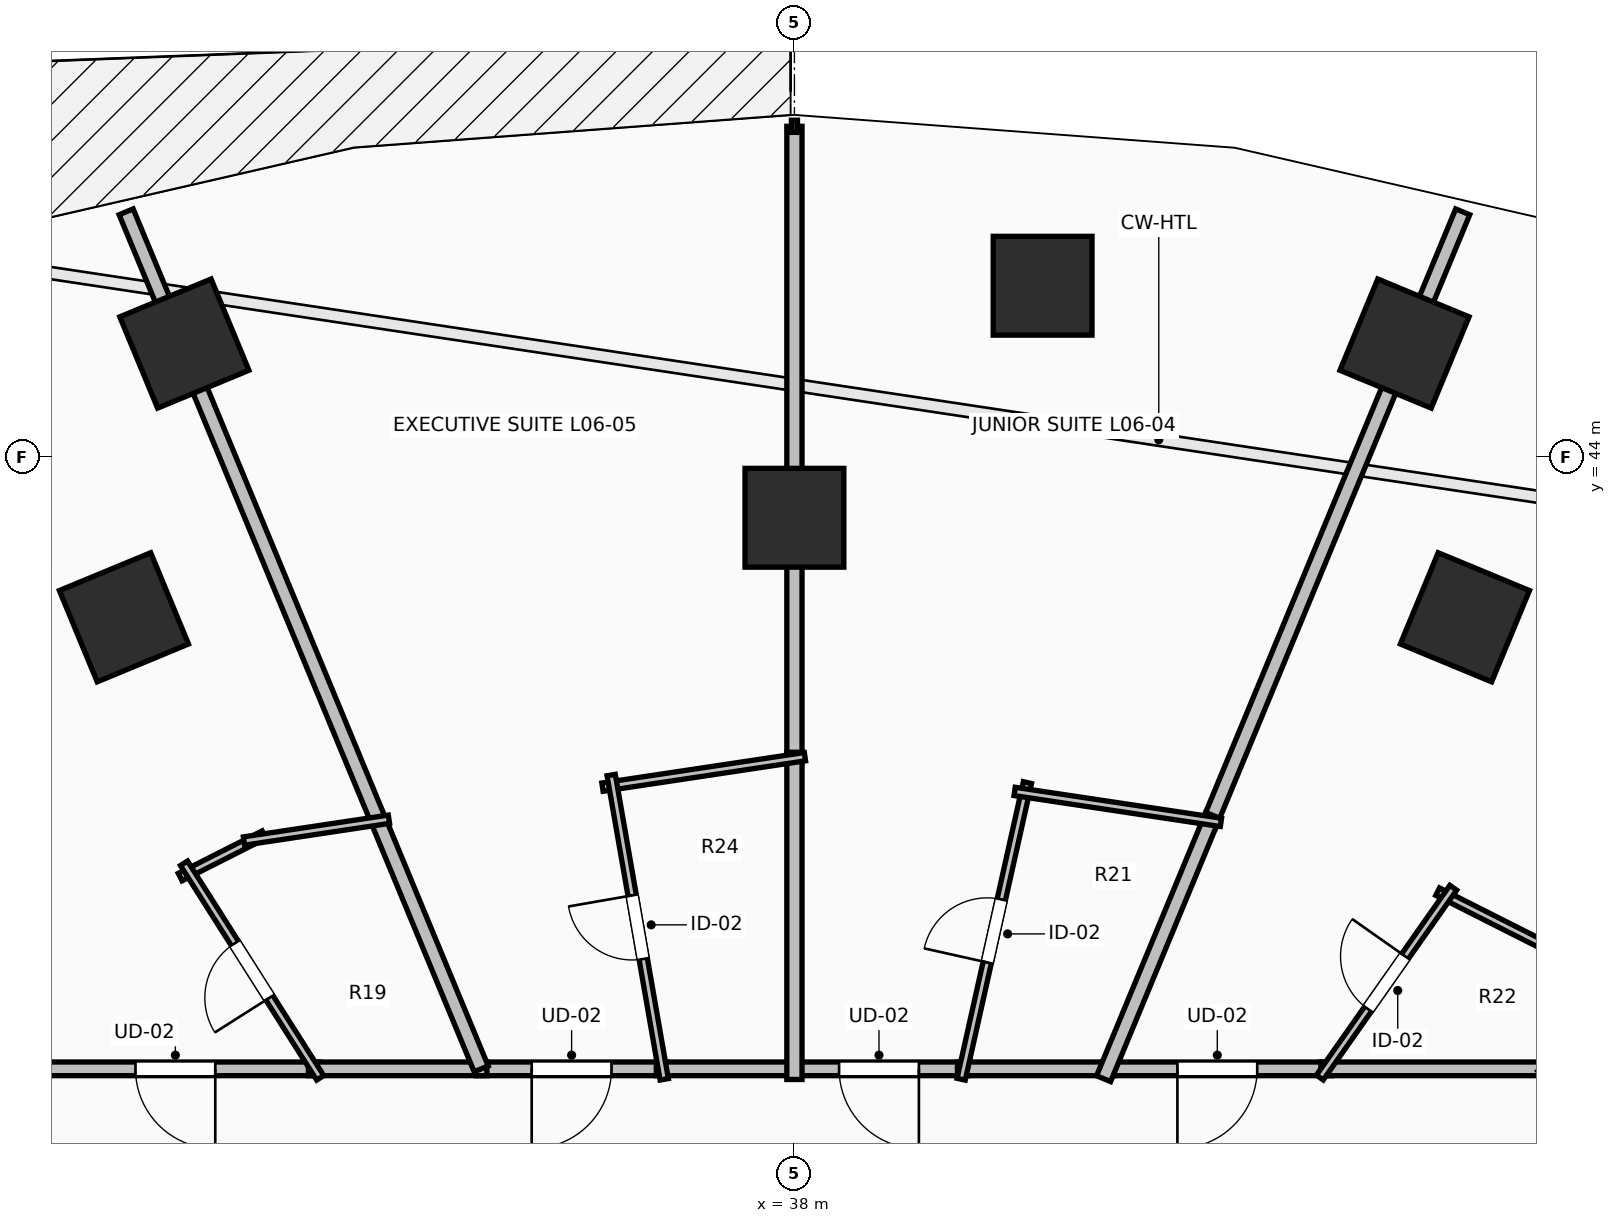
"""IFC4 building model, lengths in metres.
Left out: names, types, materials, properties, quantities, classifications, styles, units other than length and angle.
Written with IfcOpenShell. Run it as: python <this file> out.ifc"""

import sys

from ifc_helpers import new_model, si_unit, direction, frame, frame_2d, origin, origin_2d, place, context, subcontext, project, spatial, rectangle, extrude, element, fill, save


model = new_model("IFC4")
c1 = context("Model", 3, precision=1e-05, world=origin(), true_north=direction((0.0, 1.0)))
c2 = subcontext(c1, "Body", "Model", "MODEL_VIEW")
j1 = project(units=[si_unit("LENGTHUNIT", "METRE"), si_unit("PLANEANGLEUNIT", "RADIAN")], contexts=[c1])
p1 = place(None, origin())
s1 = spatial("IfcSite", under=j1, at=p1, CompositionType="ELEMENT")
p2 = place(p1, origin())
s2 = spatial("IfcBuilding", under=s1, at=p2, CompositionType="ELEMENT")
p3 = place(p2, frame((0.0, 0.0, 27.5)))
s3 = spatial("IfcBuildingStorey", under=s2, at=p3, CompositionType="ELEMENT", Elevation=27.5)
for number, where, z_axis, x_axis in (
    (1, (46.821, 41.891, 0.0), (0.0, 0.0, 1.0), (0.383, 0.924, 0.0)),
    (2, (38.0, 43.2, 0.0), (0.0, 0.0, 1.0), (0.0, 1.0, 0.0)),
    (3, (29.179, 41.891, 0.0), (0.0, 0.0, 1.0), (-0.383, 0.924, 0.0)),
    (4, (46.026, 45.492, 0.0), (0.0, 0.0, 1.0), (0.383, 0.924, 0.0)),
    (5, (41.265, 46.252, 0.0), (0.0, 0.0, 1.0), (0.0, 1.0, 0.0)),
    (6, (29.974, 45.492, 0.0), (0.0, 0.0, 1.0), (-0.383, 0.924, 0.0)),
):
    element("IfcColumn", number, at=place(p3, frame(where, z_axis=z_axis, x_axis=x_axis)), inside=s3, PredefinedType="COLUMN", context=c2, shape_type="SweptSolid", body=[
        extrude(rectangle(XDim=1.3, YDim=1.3, at=origin_2d()), origin(), (0.0, 0.0, 1.0), 3.5),
    ])
p4 = place(p3, frame((45.066, 35.95, 0.0), z_axis=(0.0, 0.0, 1.0), x_axis=(-1.0, 0.0, 0.0)))
e7 = element("IfcWall", 7, at=p4, inside=s3, PredefinedType="PARTITIONING", context=c2, shape_type="SweptSolid", body=[
    extrude(rectangle(XDim=3.005, YDim=0.18, at=frame_2d((1.502, 0.0))), origin(), (0.0, 0.0, 1.0), 3.24),
])
p5 = place(p4, frame((0.978, 0.0, 0.0)))
e8 = element("IfcOpeningElement", 8, at=p5, cuts=e7, PredefinedType="OPENING", context=c2, shape_type="SweptSolid", body=[
    extrude(rectangle(XDim=1.05, YDim=2.2, at=frame_2d((0.525, 1.1))), frame((0.0, 0.105, 0.0), z_axis=(0.0, -1.0, 0.0), x_axis=(1.0, 0.0, 0.0)), (0.0, 0.0, 1.0), 0.21),
])
p6 = place(p3, frame((48.03, 35.95, 0.0), z_axis=(0.0, 0.0, 1.0), x_axis=(-1.0, 0.0, 0.0)))
e9 = element("IfcWall", 9, at=p6, inside=s3, PredefinedType="PARTITIONING", context=c2, shape_type="SweptSolid", body=[
    extrude(rectangle(XDim=3.104, YDim=0.18, at=frame_2d((1.552, 0.0))), origin(), (0.0, 0.0, 1.0), 2.432),
])
p7 = place(p3, frame((40.285, 35.95, 0.0), z_axis=(0.0, 0.0, 1.0), x_axis=(-1.0, 0.0, 0.0)))
e10 = element("IfcWall", 10, at=p7, inside=s3, PredefinedType="PARTITIONING", context=c2, shape_type="SweptSolid", body=[
    extrude(rectangle(XDim=2.345, YDim=0.18, at=frame_2d((1.172, 0.0))), origin(), (0.0, 0.0, 1.0), 3.24),
])
p8 = place(p7, frame((0.647, 0.0, 0.0)))
e11 = element("IfcOpeningElement", 11, at=p8, cuts=e10, PredefinedType="OPENING", context=c2, shape_type="SweptSolid", body=[
    extrude(rectangle(XDim=1.05, YDim=2.2, at=frame_2d((0.525, 1.1))), frame((0.0, 0.105, 0.0), z_axis=(0.0, -1.0, 0.0), x_axis=(1.0, 0.0, 0.0)), (0.0, 0.0, 1.0), 0.21),
])
p9 = place(p3, frame((42.201, 35.95, 0.0), z_axis=(0.0, 0.0, 1.0), x_axis=(-1.0, 0.0, 0.0)))
e12 = element("IfcWall", 12, at=p9, inside=s3, PredefinedType="PARTITIONING", context=c2, shape_type="SweptSolid", body=[
    extrude(rectangle(XDim=2.056, YDim=0.18, at=frame_2d((1.028, 0.0))), origin(), (0.0, 0.0, 1.0), 3.24),
])
p10 = place(p3, frame((36.323, 35.95, 0.0), z_axis=(0.0, 0.0, 1.0), x_axis=(-1.0, 0.0, 0.0)))
e13 = element("IfcWall", 13, at=p10, inside=s3, PredefinedType="PARTITIONING", context=c2, shape_type="SweptSolid", body=[
    extrude(rectangle(XDim=2.509, YDim=0.18, at=frame_2d((1.254, 0.0))), origin(), (0.0, 0.0, 1.0), 3.24),
])
p11 = place(p10, frame((0.729, 0.0, 0.0)))
e14 = element("IfcOpeningElement", 14, at=p11, cuts=e13, PredefinedType="OPENING", context=c2, shape_type="SweptSolid", body=[
    extrude(rectangle(XDim=1.05, YDim=2.2, at=frame_2d((0.525, 1.1))), frame((0.0, 0.105, 0.0), z_axis=(0.0, -1.0, 0.0), x_axis=(1.0, 0.0, 0.0)), (0.0, 0.0, 1.0), 0.21),
])
p12 = place(p3, frame((38.08, 35.95, 0.0), z_axis=(0.0, 0.0, 1.0), x_axis=(-1.0, 0.0, 0.0)))
e15 = element("IfcWall", 15, at=p12, inside=s3, PredefinedType="PARTITIONING", context=c2, shape_type="SweptSolid", body=[
    extrude(rectangle(XDim=1.897, YDim=0.18, at=frame_2d((0.948, 0.0))), origin(), (0.0, 0.0, 1.0), 3.24),
])
p13 = place(p3, frame((31.746, 35.95, 0.0), z_axis=(0.0, 0.0, 1.0), x_axis=(-1.0, 0.0, 0.0)))
e16 = element("IfcWall", 16, at=p13, inside=s3, PredefinedType="PARTITIONING", context=c2, shape_type="SweptSolid", body=[
    extrude(rectangle(XDim=3.781, YDim=0.18, at=frame_2d((1.891, 0.0))), origin(), (0.0, 0.0, 1.0), 2.432),
])
p14 = place(p13, frame((1.365, 0.0, 0.0)))
e17 = element("IfcOpeningElement", 17, at=p14, cuts=e16, PredefinedType="OPENING", context=c2, shape_type="SweptSolid", body=[
    extrude(rectangle(XDim=1.05, YDim=2.2, at=frame_2d((0.525, 1.1))), frame((0.0, 0.105, 0.0), z_axis=(0.0, -1.0, 0.0), x_axis=(1.0, 0.0, 0.0)), (0.0, 0.0, 1.0), 0.21),
])
p15 = place(p3, frame((33.954, 35.95, 0.0), z_axis=(0.0, 0.0, 1.0), x_axis=(-1.0, 0.0, 0.0)))
e18 = element("IfcWall", 18, at=p15, inside=s3, PredefinedType="PARTITIONING", context=c2, shape_type="SweptSolid", body=[
    extrude(rectangle(XDim=2.348, YDim=0.18, at=frame_2d((1.174, 0.0))), origin(), (0.0, 0.0, 1.0), 3.24),
])
p16 = place(p3, frame((46.462, 38.281, 0.0), z_axis=(0.0, 0.0, 1.0), x_axis=(0.892486842203, -0.451073426944, 0.0)))
e19 = element("IfcWall", 19, at=p16, inside=s3, PredefinedType="PARTITIONING", context=c2, shape_type="SweptSolid", body=[
    extrude(rectangle(XDim=2.982, YDim=0.11, at=frame_2d((1.491, 0.0))), origin(), (0.0, 0.0, 1.0), 2.432),
])
p17 = place(p3, frame((44.913, 35.835, 0.0), z_axis=(0.0, 0.0, 1.0), x_axis=(0.574986040322, 0.818163219312, 0.0)))
e20 = element("IfcWall", 20, at=p17, inside=s3, PredefinedType="PARTITIONING", context=c2, shape_type="SweptSolid", body=[
    extrude(rectangle(XDim=3.052, YDim=0.11, at=frame_2d((1.526, 0.0))), origin(), (0.0, 0.0, 1.0), 2.922),
])
p18 = place(p17, frame((1.101, 0.0, 0.0)))
e21 = element("IfcOpeningElement", 21, at=p18, cuts=e20, PredefinedType="OPENING", context=c2, shape_type="SweptSolid", body=[
    extrude(rectangle(XDim=0.85, YDim=2.1, at=frame_2d((0.425, 1.05))), frame((0.0, 0.07, 0.0), z_axis=(0.0, -1.0, 0.0), x_axis=(1.0, 0.0, 0.0)), (0.0, 0.0, 1.0), 0.14),
])
p19 = place(p3, frame((46.792, 47.225, 0.0), z_axis=(0.0, 0.0, 1.0), x_axis=(-0.382750893248, -0.923851586413, 0.0)))
e22 = element("IfcWall", 22, at=p19, inside=s3, PredefinedType="PARTITIONING", context=c2, shape_type="SweptSolid", body=[
    extrude(rectangle(XDim=8.734, YDim=0.2, at=frame_2d((4.367, 0.0))), origin(), (0.0, 0.0, 1.0), 2.874),
])
p20 = place(p3, frame((43.503, 39.285, 0.0), z_axis=(0.0, 0.0, 1.0), x_axis=(-0.382867331148, -0.923803337697, 0.0)))
e23 = element("IfcWall", 23, at=p20, inside=s3, PredefinedType="PARTITIONING", context=c2, shape_type="SweptSolid", body=[
    extrude(rectangle(XDim=3.75, YDim=0.2, at=frame_2d((1.875, 0.0))), origin(), (0.0, 0.0, 1.0), 2.922),
])
p21 = place(p3, frame((40.194, 35.813, 0.0), z_axis=(0.0, 0.0, 1.0), x_axis=(0.21804880916, 0.975937865248, 0.0)))
e24 = element("IfcWall", 24, at=p21, inside=s3, PredefinedType="PARTITIONING", context=c2, shape_type="SweptSolid", body=[
    extrude(rectangle(XDim=3.998, YDim=0.11, at=frame_2d((1.999, 0.0))), origin(), (0.0, 0.0, 1.0), 2.922),
])
p22 = place(p21, frame((1.574, 0.0, 0.0)))
e25 = element("IfcOpeningElement", 25, at=p22, cuts=e24, PredefinedType="OPENING", context=c2, shape_type="SweptSolid", body=[
    extrude(rectangle(XDim=0.85, YDim=2.1, at=frame_2d((0.425, 1.05))), frame((0.0, 0.07, 0.0), z_axis=(0.0, -1.0, 0.0), x_axis=(1.0, 0.0, 0.0)), (0.0, 0.0, 1.0), 0.14),
])
p23 = place(p3, frame((40.896, 39.6, 0.0), z_axis=(0.0, 0.0, 1.0), x_axis=(0.98891024541, -0.148514398367, 0.0)))
e26 = element("IfcWall", 26, at=p23, inside=s3, PredefinedType="PARTITIONING", context=c2, shape_type="SweptSolid", body=[
    extrude(rectangle(XDim=2.745, YDim=0.11, at=frame_2d((1.373, 0.0))), origin(), (0.0, 0.0, 1.0), 3.24),
])
p24 = place(p3, frame((38.0, 48.35, 0.0), z_axis=(0.0, 0.0, 1.0), x_axis=(0.0, -1.0, 0.0)))
e27 = element("IfcWall", 27, at=p24, inside=s3, PredefinedType="PARTITIONING", context=c2, shape_type="SweptSolid", body=[
    extrude(rectangle(XDim=8.375, YDim=0.2, at=frame_2d((4.188, 0.0))), origin(), (0.0, 0.0, 1.0), 2.432),
])
p25 = place(p3, frame((38.0, 40.115, 0.0), z_axis=(0.0, 0.0, 1.0), x_axis=(0.0, -1.0, 0.0)))
e28 = element("IfcWall", 28, at=p25, inside=s3, PredefinedType="PARTITIONING", context=c2, shape_type="SweptSolid", body=[
    extrude(rectangle(XDim=4.305, YDim=0.2, at=frame_2d((2.152, 0.0))), origin(), (0.0, 0.0, 1.0), 2.922),
])
p26 = place(p3, frame((35.475, 39.656, 0.0), z_axis=(0.0, 0.0, 1.0), x_axis=(0.988878442063, 0.148726012595, 0.0)))
e29 = element("IfcWall", 29, at=p26, inside=s3, PredefinedType="PARTITIONING", context=c2, shape_type="SweptSolid", body=[
    extrude(rectangle(XDim=2.694, YDim=0.11, at=frame_2d((1.347, 0.0))), origin(), (0.0, 0.0, 1.0), 3.24),
])
p27 = place(p3, frame((36.287, 35.812, 0.0), z_axis=(0.0, 0.0, 1.0), x_axis=(-0.171838135253, 0.985125197766, 0.0)))
e30 = element("IfcWall", 30, at=p27, inside=s3, PredefinedType="PARTITIONING", context=c2, shape_type="SweptSolid", body=[
    extrude(rectangle(XDim=4.063, YDim=0.11, at=frame_2d((2.032, 0.0))), origin(), (0.0, 0.0, 1.0), 2.922),
])
p28 = place(p27, frame((1.607, 0.0, 0.0)))
e31 = element("IfcOpeningElement", 31, at=p28, cuts=e30, PredefinedType="OPENING", context=c2, shape_type="SweptSolid", body=[
    extrude(rectangle(XDim=0.85, YDim=2.1, at=frame_2d((0.425, 1.05))), frame((0.0, 0.07, 0.0), z_axis=(0.0, -1.0, 0.0), x_axis=(1.0, 0.0, 0.0)), (0.0, 0.0, 1.0), 0.14),
])
p29 = place(p3, frame((29.208, 47.225, 0.0), z_axis=(0.0, 0.0, 1.0), x_axis=(0.382723985517, -0.923862733803, 0.0)))
e32 = element("IfcWall", 32, at=p29, inside=s3, PredefinedType="PARTITIONING", context=c2, shape_type="SweptSolid", body=[
    extrude(rectangle(XDim=12.204, YDim=0.2, at=frame_2d((6.102, 0.0))), origin(), (0.0, 0.0, 1.0), 2.432),
])
p30 = place(p3, frame((29.919, 38.473, 0.0), z_axis=(0.0, 0.0, 1.0), x_axis=(0.892084606746, 0.45186840386, 0.0)))
e33 = element("IfcWall", 33, at=p30, inside=s3, PredefinedType="PARTITIONING", context=c2, shape_type="SweptSolid", body=[
    extrude(rectangle(XDim=1.236, YDim=0.11, at=frame_2d((0.618, 0.0))), origin(), (0.0, 0.0, 1.0), 3.24),
])
p31 = place(p3, frame((30.759, 38.947, 0.0), z_axis=(0.0, 0.0, 1.0), x_axis=(0.988889867338, 0.148650026153, 0.0)))
e34 = element("IfcWall", 34, at=p31, inside=s3, PredefinedType="PARTITIONING", context=c2, shape_type="SweptSolid", body=[
    extrude(rectangle(XDim=1.928, YDim=0.11, at=frame_2d((0.964, 0.0))), origin(), (0.0, 0.0, 1.0), 3.24),
])
p32 = place(p3, frame((31.761, 35.832, 0.0), z_axis=(0.0, 0.0, 1.0), x_axis=(-0.535991614842, 0.844223305067, 0.0)))
e35 = element("IfcWall", 35, at=p32, inside=s3, PredefinedType="PARTITIONING", context=c2, shape_type="SweptSolid", body=[
    extrude(rectangle(XDim=3.343, YDim=0.11, at=frame_2d((1.672, 0.0))), origin(), (0.0, 0.0, 1.0), 2.432),
])
p33 = place(p32, frame((1.247, 0.0, 0.0)))
e36 = element("IfcOpeningElement", 36, at=p33, cuts=e35, PredefinedType="OPENING", context=c2, shape_type="SweptSolid", body=[
    extrude(rectangle(XDim=0.85, YDim=2.1, at=frame_2d((0.425, 1.05))), frame((0.0, 0.07, 0.0), z_axis=(0.0, -1.0, 0.0), x_axis=(1.0, 0.0, 0.0)), (0.0, 0.0, 1.0), 0.14),
])
p34 = place(p5, origin())
e37 = element("IfcDoor", 37, at=p34, inside=s3, OperationType="SINGLE_SWING_RIGHT", PredefinedType="DOOR", context=c2, shape_type="SweptSolid", body=[
    extrude(rectangle(XDim=1.05, YDim=2.2, at=frame_2d((0.525, 1.1))), frame((0.0, 0.025, 0.0), z_axis=(0.0, -1.0, 0.0), x_axis=(1.0, 0.0, 0.0)), (0.0, 0.0, 1.0), 0.05),
])
fill(e8, e37)
p35 = place(p8, origin())
e38 = element("IfcDoor", 38, at=p35, inside=s3, OperationType="SINGLE_SWING_LEFT", PredefinedType="DOOR", context=c2, shape_type="SweptSolid", body=[
    extrude(rectangle(XDim=1.05, YDim=2.2, at=frame_2d((0.525, 1.1))), frame((0.0, 0.025, 0.0), z_axis=(0.0, -1.0, 0.0), x_axis=(1.0, 0.0, 0.0)), (0.0, 0.0, 1.0), 0.05),
])
fill(e11, e38)
p36 = place(p11, origin())
e39 = element("IfcDoor", 39, at=p36, inside=s3, OperationType="SINGLE_SWING_RIGHT", PredefinedType="DOOR", context=c2, shape_type="SweptSolid", body=[
    extrude(rectangle(XDim=1.05, YDim=2.2, at=frame_2d((0.525, 1.1))), frame((0.0, 0.025, 0.0), z_axis=(0.0, -1.0, 0.0), x_axis=(1.0, 0.0, 0.0)), (0.0, 0.0, 1.0), 0.05),
])
fill(e14, e39)
p37 = place(p14, origin())
e40 = element("IfcDoor", 40, at=p37, inside=s3, OperationType="SINGLE_SWING_LEFT", PredefinedType="DOOR", context=c2, shape_type="SweptSolid", body=[
    extrude(rectangle(XDim=1.05, YDim=2.2, at=frame_2d((0.525, 1.1))), frame((0.0, 0.025, 0.0), z_axis=(0.0, -1.0, 0.0), x_axis=(1.0, 0.0, 0.0)), (0.0, 0.0, 1.0), 0.05),
])
fill(e17, e40)
p38 = place(p18, origin())
e41 = element("IfcDoor", 41, at=p38, inside=s3, OperationType="SINGLE_SWING_RIGHT", PredefinedType="DOOR", context=c2, shape_type="SweptSolid", body=[
    extrude(rectangle(XDim=0.85, YDim=2.1, at=frame_2d((0.425, 1.05))), frame((0.0, 0.025, 0.0), z_axis=(0.0, -1.0, 0.0), x_axis=(1.0, 0.0, 0.0)), (0.0, 0.0, 1.0), 0.05),
])
fill(e21, e41)
p39 = place(p22, origin())
e42 = element("IfcDoor", 42, at=p39, inside=s3, OperationType="SINGLE_SWING_LEFT", PredefinedType="DOOR", context=c2, shape_type="SweptSolid", body=[
    extrude(rectangle(XDim=0.85, YDim=2.1, at=frame_2d((0.425, 1.05))), frame((0.0, 0.025, 0.0), z_axis=(0.0, -1.0, 0.0), x_axis=(1.0, 0.0, 0.0)), (0.0, 0.0, 1.0), 0.05),
])
fill(e25, e42)
p40 = place(p28, origin())
e43 = element("IfcDoor", 43, at=p40, inside=s3, OperationType="SINGLE_SWING_RIGHT", PredefinedType="DOOR", context=c2, shape_type="SweptSolid", body=[
    extrude(rectangle(XDim=0.85, YDim=2.1, at=frame_2d((0.425, 1.05))), frame((0.0, 0.025, 0.0), z_axis=(0.0, -1.0, 0.0), x_axis=(1.0, 0.0, 0.0)), (0.0, 0.0, 1.0), 0.05),
])
fill(e31, e43)
p41 = place(p33, origin())
e44 = element("IfcDoor", 44, at=p41, inside=s3, OperationType="SINGLE_SWING_LEFT", PredefinedType="DOOR", context=c2, shape_type="SweptSolid", body=[
    extrude(rectangle(XDim=0.85, YDim=2.1, at=frame_2d((0.425, 1.05))), frame((0.0, 0.025, 0.0), z_axis=(0.0, -1.0, 0.0), x_axis=(1.0, 0.0, 0.0)), (0.0, 0.0, 1.0), 0.05),
])
fill(e36, e44)
save(model, sys.argv[1])
